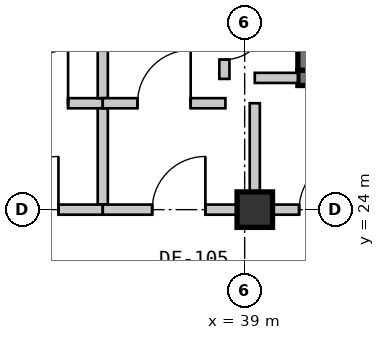
"""IFC4 building model, lengths in metres.
Left out: names, types, materials, properties, quantities, classifications, styles, units other than length and angle.
Written with IfcOpenShell. Run it as: python <this file> out.ifc"""

import sys

from ifc_helpers import new_model, si_unit, direction, frame, frame_2d, origin, origin_2d, place, context, subcontext, project, spatial, rectangle, extrude, source, transform, mapped, element, fill, save


model = new_model("IFC4")
c1 = context("Model", 3, precision=1e-05, world=origin(), true_north=direction((0.0, 1.0)))
c2 = subcontext(c1, "Body", "Model", "MODEL_VIEW")
j1 = project(units=[si_unit("LENGTHUNIT", "METRE"), si_unit("PLANEANGLEUNIT", "RADIAN")], contexts=[c1])
p1 = place(None, origin())
s1 = spatial("IfcSite", under=j1, at=p1, CompositionType="ELEMENT")
p2 = place(p1, origin())
s2 = spatial("IfcBuilding", under=s1, at=p2, CompositionType="ELEMENT")
p3 = place(p2, frame((0.0, 0.0, 80.85)))
s3 = spatial("IfcBuildingStorey", under=s2, at=p3, CompositionType="ELEMENT", Elevation=80.85)
m1 = source(origin(), c2, "Body", "SweptSolid", [
    extrude(rectangle(XDim=0.7, YDim=0.7, at=origin_2d()), origin(), (0.0, 0.0, 1.0), 3.15),
])
p4 = place(p3, frame((39.2, 24.0, 0.0), z_axis=(0.0, 0.0, 1.0), x_axis=(1.0, 0.0, 0.0)))
e1 = element("IfcColumn", 1, at=p4, inside=s3, PredefinedType="COLUMN", context=c2, shape_type="MappedRepresentation", body=[
    mapped(m1, transform((0.0, 0.0, 0.0), scale=1.0)),
])
m2 = source(origin(), c2, "Body", "SweptSolid", [
    extrude(rectangle(XDim=1.47, YDim=0.3, at=frame_2d((0.735, 0.0))), origin(), (0.0, 0.0, 1.0), 2.93),
])
p5 = place(p3, frame((40.05, 26.6, 0.0), z_axis=(0.0, 0.0, 1.0), x_axis=(1.0, 0.0, 0.0)))
e2 = element("IfcWall", 2, at=p5, inside=s3, PredefinedType="SHEAR", context=c2, shape_type="MappedRepresentation", body=[
    mapped(m2, transform((0.0, 0.0, 0.0), scale=1.0)),
])
m3 = source(origin(), c2, "Body", "SweptSolid", [
    extrude(rectangle(XDim=1.3, YDim=0.3, at=frame_2d((0.65, 0.0))), origin(), (0.0, 0.0, 1.0), 2.93),
])
p6 = place(p3, frame((40.2, 28.05, 0.0), z_axis=(0.0, 0.0, 1.0), x_axis=(0.0, -1.0, 0.0)))
e3 = element("IfcWall", 3, at=p6, inside=s3, PredefinedType="SHEAR", context=c2, shape_type="MappedRepresentation", body=[
    mapped(m3, transform((0.0, 0.0, 0.0), scale=1.0)),
])
m4 = source(origin(), c2, "Body", "SweptSolid", [
    extrude(rectangle(XDim=2.42, YDim=0.2, at=frame_2d((1.21, 0.0))), origin(), (0.0, 0.0, 1.0), 2.93),
])
p7 = place(p3, frame((33.78, 26.1, 0.0), z_axis=(0.0, 0.0, 1.0), x_axis=(1.0, 0.0, 0.0)))
e4 = element("IfcWall", 4, at=p7, inside=s3, PredefinedType="SOLIDWALL", context=c2, shape_type="MappedRepresentation", body=[
    mapped(m4, transform((0.0, 0.0, 0.0), scale=1.0)),
])
m5 = source(origin(), c2, "Body", "SweptSolid", [
    extrude(rectangle(XDim=1.05, YDim=2.1, at=frame_2d((0.525, 1.05))), frame((0.0, 0.11, 0.0), z_axis=(0.0, -1.0, 0.0), x_axis=(1.0, 0.0, 0.0)), (0.0, 0.0, 1.0), 0.22),
])
p8 = place(p7, frame((0.685, 0.0, 0.0)))
e5 = element("IfcOpeningElement", 5, at=p8, cuts=e4, PredefinedType="OPENING", context=c2, shape_type="MappedRepresentation", body=[
    mapped(m5, transform((0.0, 0.0, 0.0), scale=1.0)),
])
m6 = source(origin(), c2, "Body", "SweptSolid", [
    extrude(rectangle(XDim=1.9, YDim=0.2, at=frame_2d((0.95, 0.0))), origin(), (0.0, 0.0, 1.0), 2.93),
])
p9 = place(p3, frame((36.2, 26.0, 0.0), z_axis=(0.0, 0.0, 1.0), x_axis=(0.0, -1.0, 0.0)))
e6 = element("IfcWall", 6, at=p9, inside=s3, PredefinedType="SOLIDWALL", context=c2, shape_type="MappedRepresentation", body=[
    mapped(m6, transform((0.0, 0.0, 0.0), scale=1.0)),
])
m7 = source(origin(), c2, "Body", "SweptSolid", [
    extrude(rectangle(XDim=2.8, YDim=0.2, at=frame_2d((1.4, 0.0))), origin(), (0.0, 0.0, 1.0), 2.47),
])
p10 = place(p3, frame((36.2, 24.0, 0.0), z_axis=(0.0, 0.0, 1.0), x_axis=(-1.0, 0.0, 0.0)))
e7 = element("IfcWall", 7, at=p10, inside=s3, PredefinedType="SOLIDWALL", context=c2, shape_type="MappedRepresentation", body=[
    mapped(m7, transform((0.0, 0.0, 0.0), scale=1.0)),
])
p11 = place(p10, frame((0.875, 0.0, 0.0)))
e8 = element("IfcOpeningElement", 8, at=p11, cuts=e7, PredefinedType="OPENING", context=c2, shape_type="MappedRepresentation", body=[
    mapped(m5, transform((0.0, 0.0, 0.0), scale=1.0)),
])
m8 = source(origin(), c2, "Body", "SweptSolid", [
    extrude(rectangle(XDim=1.9, YDim=0.2, at=frame_2d((0.95, 0.0))), origin(), (0.0, 0.0, 1.0), 2.93),
])
p12 = place(p3, frame((36.2, 28.1, 0.0), z_axis=(0.0, 0.0, 1.0), x_axis=(0.0, -1.0, 0.0)))
e9 = element("IfcWall", 9, at=p12, inside=s3, PredefinedType="SOLIDWALL", context=c2, shape_type="MappedRepresentation", body=[
    mapped(m8, transform((0.0, 0.0, 0.0), scale=1.0)),
])
m9 = source(origin(), c2, "Body", "SweptSolid", [
    extrude(rectangle(XDim=2.42, YDim=0.2, at=frame_2d((1.21, 0.0))), origin(), (0.0, 0.0, 1.0), 2.93),
])
p13 = place(p3, frame((36.2, 26.1, 0.0), z_axis=(0.0, 0.0, 1.0), x_axis=(1.0, 0.0, 0.0)))
e10 = element("IfcWall", 10, at=p13, inside=s3, PredefinedType="SOLIDWALL", context=c2, shape_type="MappedRepresentation", body=[
    mapped(m9, transform((0.0, 0.0, 0.0), scale=1.0)),
])
p14 = place(p13, frame((0.685, 0.0, 0.0)))
e11 = element("IfcOpeningElement", 11, at=p14, cuts=e10, PredefinedType="OPENING", context=c2, shape_type="MappedRepresentation", body=[
    mapped(m5, transform((0.0, 0.0, 0.0), scale=1.0)),
])
m10 = source(origin(), c2, "Body", "SweptSolid", [
    extrude(rectangle(XDim=2.0, YDim=0.2, at=frame_2d((1.0, 0.0))), origin(), (0.0, 0.0, 1.0), 2.47),
])
p15 = place(p3, frame((39.2, 26.1, 0.0), z_axis=(0.0, 0.0, 1.0), x_axis=(0.0, -1.0, 0.0)))
e12 = element("IfcWall", 12, at=p15, inside=s3, PredefinedType="SOLIDWALL", context=c2, shape_type="MappedRepresentation", body=[
    mapped(m10, transform((0.0, 0.0, 0.0), scale=1.0)),
])
m11 = source(origin(), c2, "Body", "SweptSolid", [
    extrude(rectangle(XDim=3.0, YDim=0.2, at=frame_2d((1.5, 0.0))), origin(), (0.0, 0.0, 1.0), 2.47),
])
p16 = place(p3, frame((39.2, 24.0, 0.0), z_axis=(0.0, 0.0, 1.0), x_axis=(-1.0, 0.0, 0.0)))
e13 = element("IfcWall", 13, at=p16, inside=s3, PredefinedType="SOLIDWALL", context=c2, shape_type="MappedRepresentation", body=[
    mapped(m11, transform((0.0, 0.0, 0.0), scale=1.0)),
])
p17 = place(p16, frame((0.975, 0.0, 0.0)))
e14 = element("IfcOpeningElement", 14, at=p17, cuts=e13, PredefinedType="OPENING", context=c2, shape_type="MappedRepresentation", body=[
    mapped(m5, transform((0.0, 0.0, 0.0), scale=1.0)),
])
m12 = source(origin(), c2, "Body", "SweptSolid", [
    extrude(rectangle(XDim=1.47, YDim=0.2, at=frame_2d((0.735, 0.0))), origin(), (0.0, 0.0, 1.0), 2.93),
])
p18 = place(p3, frame((38.6, 28.05, 0.0), z_axis=(0.0, 0.0, 1.0), x_axis=(0.0, -1.0, 0.0)))
e15 = element("IfcWall", 15, at=p18, inside=s3, PredefinedType="SOLIDWALL", context=c2, shape_type="MappedRepresentation", body=[
    mapped(m12, transform((0.0, 0.0, 0.0), scale=1.0)),
])
m13 = source(origin(), c2, "Body", "SweptSolid", [
    extrude(rectangle(XDim=0.86, YDim=2.1, at=frame_2d((0.43, 1.05))), frame((0.0, 0.11, 0.0), z_axis=(0.0, -1.0, 0.0), x_axis=(1.0, 0.0, 0.0)), (0.0, 0.0, 1.0), 0.22),
])
p19 = place(p18, frame((0.23, 0.0, 0.0)))
e16 = element("IfcOpeningElement", 16, at=p19, cuts=e15, PredefinedType="OPENING", context=c2, shape_type="MappedRepresentation", body=[
    mapped(m13, transform((0.0, 0.0, 0.0), scale=1.0)),
])
m14 = source(origin(), c2, "Body", "SweptSolid", [
    extrude(rectangle(XDim=0.85, YDim=0.2, at=frame_2d((0.425, 0.0))), origin(), (0.0, 0.0, 1.0), 2.93),
])
p20 = place(p3, frame((39.2, 26.6, 0.0), z_axis=(0.0, 0.0, 1.0), x_axis=(1.0, 0.0, 0.0)))
e17 = element("IfcWall", 17, at=p20, inside=s3, PredefinedType="SOLIDWALL", context=c2, shape_type="MappedRepresentation", body=[
    mapped(m14, transform((0.0, 0.0, 0.0), scale=1.0)),
])
m15 = source(origin(), c2, "Body", "SweptSolid", [
    extrude(rectangle(XDim=2.3, YDim=0.2, at=frame_2d((1.15, 0.0))), origin(), (0.0, 0.0, 1.0), 2.397),
])
p21 = place(p3, frame((41.5, 24.0, 0.0), z_axis=(0.0, 0.0, 1.0), x_axis=(-1.0, 0.0, 0.0)))
e18 = element("IfcWall", 18, at=p21, inside=s3, PredefinedType="SOLIDWALL", context=c2, shape_type="MappedRepresentation", body=[
    mapped(m15, transform((0.0, 0.0, 0.0), scale=1.0)),
])
p22 = place(p21, frame((0.375, 0.0, 0.0)))
e19 = element("IfcOpeningElement", 19, at=p22, cuts=e18, PredefinedType="OPENING", context=c2, shape_type="MappedRepresentation", body=[
    mapped(m5, transform((0.0, 0.0, 0.0), scale=1.0)),
])
m16 = source(origin(), c2, "Body", "SweptSolid", [
    extrude(rectangle(XDim=1.05, YDim=2.1, at=frame_2d((0.525, 1.05))), frame((0.0, 0.025, 0.0), z_axis=(0.0, -1.0, 0.0), x_axis=(1.0, 0.0, 0.0)), (0.0, 0.0, 1.0), 0.05),
])
p23 = place(p8, origin())
e20 = element("IfcDoor", 20, at=p23, inside=s3, OperationType="SINGLE_SWING_RIGHT", PredefinedType="DOOR", context=c2, shape_type="MappedRepresentation", body=[
    mapped(m16, transform((0.0, 0.0, 0.0), scale=1.0)),
])
fill(e5, e20)
p24 = place(p11, frame((1.05, 0.0, 0.0), z_axis=(0.0, 0.0, 1.0), x_axis=(-1.0, 0.0, 0.0)))
e21 = element("IfcDoor", 21, at=p24, inside=s3, OperationType="SINGLE_SWING_RIGHT", PredefinedType="DOOR", context=c2, shape_type="MappedRepresentation", body=[
    mapped(m16, transform((0.0, 0.0, 0.0), scale=1.0)),
])
fill(e8, e21)
p25 = place(p14, origin())
e22 = element("IfcDoor", 22, at=p25, inside=s3, OperationType="SINGLE_SWING_RIGHT", PredefinedType="DOOR", context=c2, shape_type="MappedRepresentation", body=[
    mapped(m16, transform((0.0, 0.0, 0.0), scale=1.0)),
])
fill(e11, e22)
p26 = place(p17, frame((1.05, 0.0, 0.0), z_axis=(0.0, 0.0, 1.0), x_axis=(-1.0, 0.0, 0.0)))
e23 = element("IfcDoor", 23, at=p26, inside=s3, OperationType="SINGLE_SWING_RIGHT", PredefinedType="DOOR", context=c2, shape_type="MappedRepresentation", body=[
    mapped(m16, transform((0.0, 0.0, 0.0), scale=1.0)),
])
fill(e14, e23)
p27 = place(p22, frame((1.05, 0.0, 0.0), z_axis=(0.0, 0.0, 1.0), x_axis=(-1.0, 0.0, 0.0)))
e24 = element("IfcDoor", 24, at=p27, inside=s3, OperationType="SINGLE_SWING_RIGHT", PredefinedType="DOOR", context=c2, shape_type="MappedRepresentation", body=[
    mapped(m16, transform((0.0, 0.0, 0.0), scale=1.0)),
])
fill(e19, e24)
m17 = source(origin(), c2, "Body", "SweptSolid", [
    extrude(rectangle(XDim=0.86, YDim=2.1, at=frame_2d((0.43, 1.05))), frame((0.0, 0.025, 0.0), z_axis=(0.0, -1.0, 0.0), x_axis=(1.0, 0.0, 0.0)), (0.0, 0.0, 1.0), 0.05),
])
p28 = place(p19, origin())
e25 = element("IfcDoor", 25, at=p28, inside=s3, OperationType="SINGLE_SWING_LEFT", PredefinedType="DOOR", context=c2, shape_type="MappedRepresentation", body=[
    mapped(m17, transform((0.0, 0.0, 0.0), scale=1.0)),
])
fill(e16, e25)
save(model, sys.argv[1])
